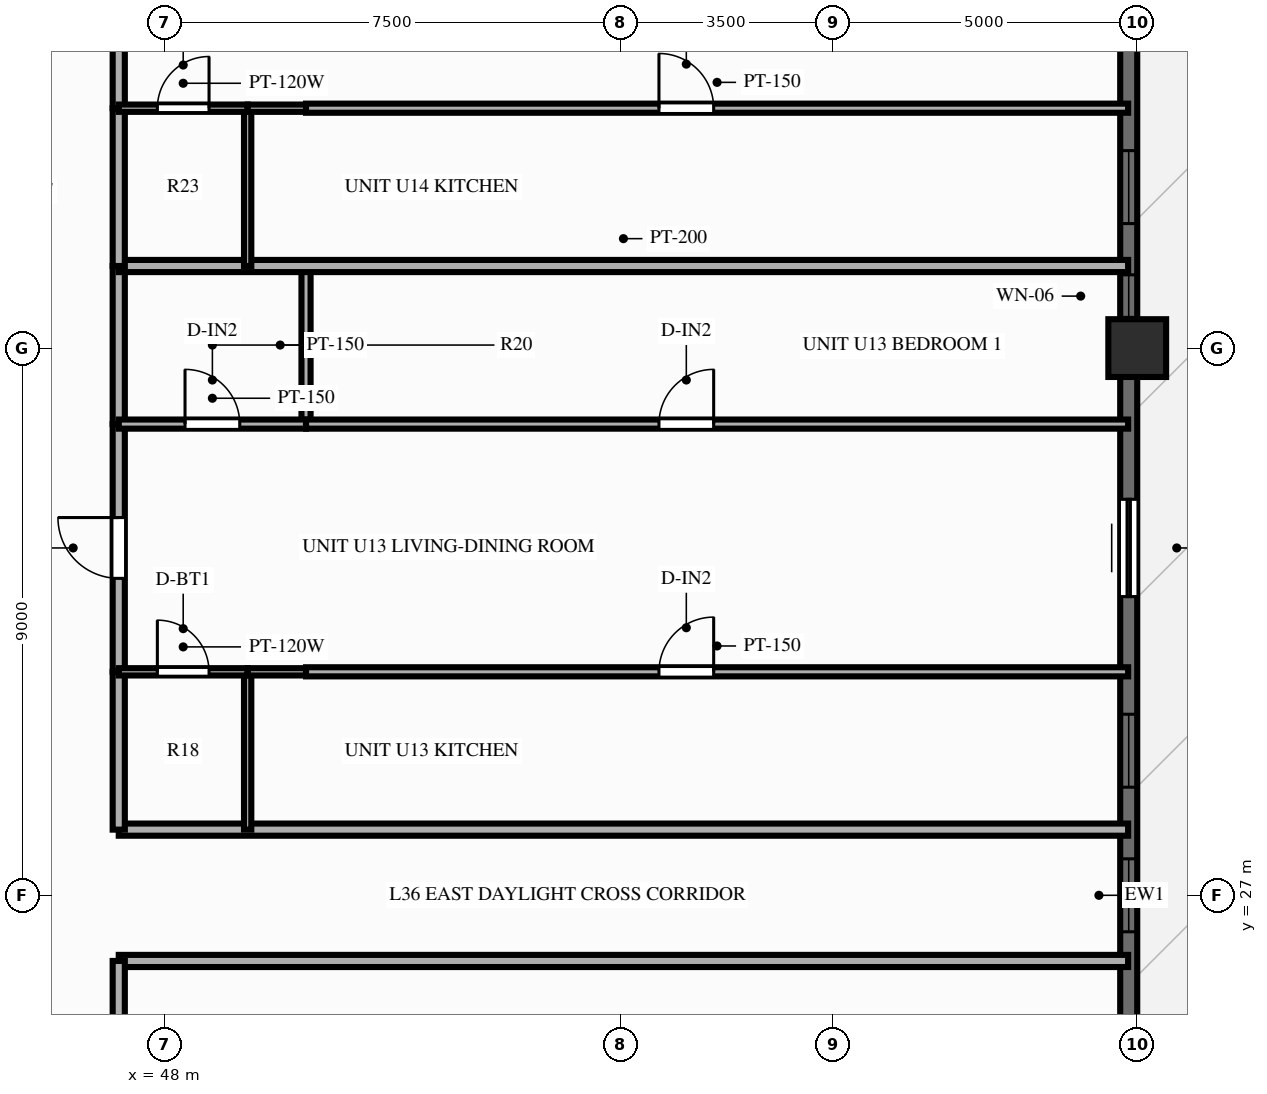
"""IFC4 building model, lengths in metres.
Left out: names, types, materials, properties, quantities, classifications, styles, units other than length and angle.
Written with IfcOpenShell. Run it as: python <this file> out.ifc"""

import sys

from ifc_helpers import new_model, si_unit, direction, frame, frame_2d, origin, origin_2d, place, context, subcontext, project, spatial, rectangle, extrude, source, transform, mapped, element, fill, save


model = new_model("IFC4")
c1 = context("Model", 3, precision=1e-05, world=origin(), true_north=direction((0.0, 1.0)))
c2 = subcontext(c1, "Body", "Model", "MODEL_VIEW")
j1 = project(units=[si_unit("LENGTHUNIT", "METRE"), si_unit("PLANEANGLEUNIT", "RADIAN")], contexts=[c1])
p1 = place(None, origin())
s1 = spatial("IfcSite", under=j1, at=p1, CompositionType="ELEMENT")
p2 = place(p1, origin())
s2 = spatial("IfcBuilding", under=s1, at=p2, CompositionType="ELEMENT")
p3 = place(p2, frame((0.0, 0.0, 113.85)))
s3 = spatial("IfcBuildingStorey", under=s2, at=p3, CompositionType="ELEMENT", Elevation=113.85)
m1 = source(origin(), c2, "Body", "SweptSolid", [
    extrude(rectangle(XDim=0.95, YDim=0.95, at=origin_2d()), origin(), (0.0, 0.0, 1.0), 3.0),
])
p4 = place(p3, frame((64.0, 36.0, 0.0), z_axis=(0.0, 0.0, 1.0), x_axis=(1.0, 0.0, 0.0)))
e1 = element("IfcColumn", 1, at=p4, inside=s3, PredefinedType="COLUMN", context=c2, shape_type="MappedRepresentation", body=[
    mapped(m1, transform((0.0, 0.0, 0.0), scale=1.0)),
])
p5 = place(p3, frame((63.86, 7.2, 0.0), z_axis=(0.0, 0.0, 1.0), x_axis=(0.0, 1.0, 0.0)))
e2 = element("IfcWall", 2, at=p5, inside=s3, PredefinedType="SOLIDWALL", context=c2, shape_type="SweptSolid", body=[
    extrude(rectangle(XDim=39.6, YDim=0.28, at=frame_2d((19.8, 0.0))), origin(), (0.0, 0.0, 1.0), 2.28),
])
p6 = place(p5, frame((1.56, 0.0, 0.25)))
e3 = element("IfcOpeningElement", 3, at=p6, cuts=e2, PredefinedType="OPENING", context=c2, shape_type="SweptSolid", body=[
    extrude(rectangle(XDim=1.2, YDim=1.5, at=frame_2d((0.6, 0.75))), frame((0.0, 0.152, 0.0), z_axis=(0.0, -1.0, 0.0), x_axis=(1.0, 0.0, 0.0)), (0.0, 0.0, 1.0), 0.304),
])
p7 = place(p5, frame((4.829, 0.0, 0.25)))
e4 = element("IfcOpeningElement", 4, at=p7, cuts=e2, PredefinedType="OPENING", context=c2, shape_type="SweptSolid", body=[
    extrude(rectangle(XDim=1.2, YDim=1.5, at=frame_2d((0.6, 0.75))), frame((0.0, 0.152, 0.0), z_axis=(0.0, -1.0, 0.0), x_axis=(1.0, 0.0, 0.0)), (0.0, 0.0, 1.0), 0.304),
])
p8 = place(p5, frame((7.567, 0.0, 0.25)))
e5 = element("IfcOpeningElement", 5, at=p8, cuts=e2, PredefinedType="OPENING", context=c2, shape_type="SweptSolid", body=[
    extrude(rectangle(XDim=1.2, YDim=1.5, at=frame_2d((0.6, 0.75))), frame((0.0, 0.152, 0.0), z_axis=(0.0, -1.0, 0.0), x_axis=(1.0, 0.0, 0.0)), (0.0, 0.0, 1.0), 0.304),
])
p9 = place(p5, frame((11.476, 0.0, 0.25)))
e6 = element("IfcOpeningElement", 6, at=p9, cuts=e2, PredefinedType="OPENING", context=c2, shape_type="SweptSolid", body=[
    extrude(rectangle(XDim=0.95, YDim=1.5, at=frame_2d((0.475, 0.75))), frame((0.0, 0.152, 0.0), z_axis=(0.0, -1.0, 0.0), x_axis=(1.0, 0.0, 0.0)), (0.0, 0.0, 1.0), 0.304),
])
p10 = place(p5, frame((13.552, 0.0, 0.25)))
e7 = element("IfcOpeningElement", 7, at=p10, cuts=e2, PredefinedType="OPENING", context=c2, shape_type="SweptSolid", body=[
    extrude(rectangle(XDim=1.2, YDim=1.5, at=frame_2d((0.6, 0.75))), frame((0.0, 0.152, 0.0), z_axis=(0.0, -1.0, 0.0), x_axis=(1.0, 0.0, 0.0)), (0.0, 0.0, 1.0), 0.304),
])
p11 = place(p5, frame((16.518, 0.0, 0.25)))
e8 = element("IfcOpeningElement", 8, at=p11, cuts=e2, PredefinedType="OPENING", context=c2, shape_type="SweptSolid", body=[
    extrude(rectangle(XDim=1.2, YDim=1.5, at=frame_2d((0.6, 0.75))), frame((0.0, 0.152, 0.0), z_axis=(0.0, -1.0, 0.0), x_axis=(1.0, 0.0, 0.0)), (0.0, 0.0, 1.0), 0.304),
])
p12 = place(p5, frame((19.2, 0.0, 0.25)))
e9 = element("IfcOpeningElement", 9, at=p12, cuts=e2, PredefinedType="OPENING", context=c2, shape_type="SweptSolid", body=[
    extrude(rectangle(XDim=1.2, YDim=1.5, at=frame_2d((0.6, 0.75))), frame((0.0, 0.152, 0.0), z_axis=(0.0, -1.0, 0.0), x_axis=(1.0, 0.0, 0.0)), (0.0, 0.0, 1.0), 0.304),
])
p13 = place(p5, frame((21.578, 0.0, 0.25)))
e10 = element("IfcOpeningElement", 10, at=p13, cuts=e2, PredefinedType="OPENING", context=c2, shape_type="SweptSolid", body=[
    extrude(rectangle(XDim=1.2, YDim=1.5, at=frame_2d((0.6, 0.75))), frame((0.0, 0.152, 0.0), z_axis=(0.0, -1.0, 0.0), x_axis=(1.0, 0.0, 0.0)), (0.0, 0.0, 1.0), 0.304),
])
p14 = place(p5, frame((26.313, 0.0, 0.0), z_axis=(0.0, 0.0, 1.0), x_axis=(-1.0, 0.0, 0.0)))
e11 = element("IfcOpeningElement", 11, at=p14, cuts=e2, PredefinedType="OPENING", context=c2, shape_type="SweptSolid", body=[
    extrude(rectangle(XDim=1.6, YDim=2.15, at=frame_2d((0.8, 1.075))), frame((0.0, 0.152, 0.0), z_axis=(0.0, -1.0, 0.0), x_axis=(1.0, 0.0, 0.0)), (0.0, 0.0, 1.0), 0.304),
])
p15 = place(p5, frame((29.305, 0.0, 0.25)))
e12 = element("IfcOpeningElement", 12, at=p15, cuts=e2, PredefinedType="OPENING", context=c2, shape_type="SweptSolid", body=[
    extrude(rectangle(XDim=0.7, YDim=1.5, at=frame_2d((0.35, 0.75))), frame((0.0, 0.152, 0.0), z_axis=(0.0, -1.0, 0.0), x_axis=(1.0, 0.0, 0.0)), (0.0, 0.0, 1.0), 0.304),
])
p16 = place(p5, frame((30.848, 0.0, 0.25)))
e13 = element("IfcOpeningElement", 13, at=p16, cuts=e2, PredefinedType="OPENING", context=c2, shape_type="SweptSolid", body=[
    extrude(rectangle(XDim=1.2, YDim=1.5, at=frame_2d((0.6, 0.75))), frame((0.0, 0.152, 0.0), z_axis=(0.0, -1.0, 0.0), x_axis=(1.0, 0.0, 0.0)), (0.0, 0.0, 1.0), 0.304),
])
p17 = place(p5, frame((34.183, 0.0, 0.25)))
e14 = element("IfcOpeningElement", 14, at=p17, cuts=e2, PredefinedType="OPENING", context=c2, shape_type="SweptSolid", body=[
    extrude(rectangle(XDim=1.2, YDim=1.5, at=frame_2d((0.6, 0.75))), frame((0.0, 0.152, 0.0), z_axis=(0.0, -1.0, 0.0), x_axis=(1.0, 0.0, 0.0)), (0.0, 0.0, 1.0), 0.304),
])
p18 = place(p5, frame((37.452, 0.0, 0.25)))
e15 = element("IfcOpeningElement", 15, at=p18, cuts=e2, PredefinedType="OPENING", context=c2, shape_type="SweptSolid", body=[
    extrude(rectangle(XDim=1.2, YDim=1.5, at=frame_2d((0.6, 0.75))), frame((0.0, 0.152, 0.0), z_axis=(0.0, -1.0, 0.0), x_axis=(1.0, 0.0, 0.0)), (0.0, 0.0, 1.0), 0.304),
])
p19 = place(p3, frame((47.25, 25.92, 0.0), z_axis=(0.0, 0.0, 1.0), x_axis=(1.0, 0.0, 0.0)))
e16 = element("IfcWall", 16, at=p19, inside=s3, PredefinedType="PARTITIONING", context=c2, shape_type="SweptSolid", body=[
    extrude(rectangle(XDim=16.6, YDim=0.2, at=frame_2d((8.3, 0.0))), origin(), (0.0, 0.0, 1.0), 2.79),
])
p20 = place(p3, frame((47.25, 22.716, 0.0), z_axis=(0.0, 0.0, 1.0), x_axis=(0.0, 1.0, 0.0)))
e17 = element("IfcWall", 17, at=p20, inside=s3, PredefinedType="PARTITIONING", context=c2, shape_type="SweptSolid", body=[
    extrude(rectangle(XDim=3.204, YDim=0.2, at=frame_2d((1.602, 0.0))), origin(), (0.0, 0.0, 1.0), 2.79),
])
p21 = place(p20, frame((1.102, 0.0, 0.0)))
e18 = element("IfcOpeningElement", 18, at=p21, cuts=e17, PredefinedType="OPENING", context=c2, shape_type="SweptSolid", body=[
    extrude(rectangle(XDim=1.0, YDim=2.15, at=frame_2d((0.5, 1.075))), frame((0.0, 0.112, 0.0), z_axis=(0.0, -1.0, 0.0), x_axis=(1.0, 0.0, 0.0)), (0.0, 0.0, 1.0), 0.224),
])
p22 = place(p3, frame((47.25, 28.08, 0.0), z_axis=(0.0, 0.0, 1.0), x_axis=(1.0, 0.0, 0.0)))
e19 = element("IfcWall", 19, at=p22, inside=s3, PredefinedType="PARTITIONING", context=c2, shape_type="SweptSolid", body=[
    extrude(rectangle(XDim=16.6, YDim=0.2, at=frame_2d((8.3, 0.0))), origin(), (0.0, 0.0, 1.0), 2.79),
])
p23 = place(p3, frame((47.25, 28.08, 0.0), z_axis=(0.0, 0.0, 1.0), x_axis=(0.0, 1.0, 0.0)))
e20 = element("IfcWall", 20, at=p23, inside=s3, PredefinedType="PARTITIONING", context=c2, shape_type="SweptSolid", body=[
    extrude(rectangle(XDim=2.595, YDim=0.2, at=frame_2d((1.298, 0.0))), origin(), (0.0, 0.0, 1.0), 2.79),
])
p24 = place(p3, frame((47.25, 30.676, 0.0), z_axis=(0.0, 0.0, 1.0), x_axis=(0.0, 1.0, 0.0)))
e21 = element("IfcWall", 21, at=p24, inside=s3, PredefinedType="PARTITIONING", context=c2, shape_type="SweptSolid", body=[
    extrude(rectangle(XDim=4.074, YDim=0.2, at=frame_2d((2.037, 0.0))), origin(), (0.0, 0.0, 1.0), 2.79),
])
p25 = place(p24, frame((1.537, 0.0, 0.0)))
e22 = element("IfcOpeningElement", 22, at=p25, cuts=e21, PredefinedType="OPENING", context=c2, shape_type="SweptSolid", body=[
    extrude(rectangle(XDim=1.0, YDim=2.15, at=frame_2d((0.5, 1.075))), frame((0.0, 0.112, 0.0), z_axis=(0.0, -1.0, 0.0), x_axis=(1.0, 0.0, 0.0)), (0.0, 0.0, 1.0), 0.224),
])
p26 = place(p3, frame((47.25, 34.75, 0.0), z_axis=(0.0, 0.0, 1.0), x_axis=(0.0, 1.0, 0.0)))
e23 = element("IfcWall", 23, at=p26, inside=s3, PredefinedType="PARTITIONING", context=c2, shape_type="SweptSolid", body=[
    extrude(rectangle(XDim=2.6, YDim=0.2, at=frame_2d((1.3, 0.0))), origin(), (0.0, 0.0, 1.0), 2.79),
])
p27 = place(p3, frame((49.37, 28.08, 0.0), z_axis=(0.0, 0.0, 1.0), x_axis=(0.0, 1.0, 0.0)))
e24 = element("IfcWall", 24, at=p27, inside=s3, PredefinedType="PARTITIONING", context=c2, shape_type="SweptSolid", body=[
    extrude(rectangle(XDim=2.595, YDim=0.12, at=frame_2d((1.298, 0.0))), origin(), (0.0, 0.0, 1.0), 2.79),
])
p28 = place(p3, frame((50.33, 34.75, 0.0), z_axis=(0.0, 0.0, 1.0), x_axis=(0.0, 1.0, 0.0)))
e25 = element("IfcWall", 25, at=p28, inside=s3, PredefinedType="PARTITIONING", context=c2, shape_type="SweptSolid", body=[
    extrude(rectangle(XDim=2.6, YDim=0.15, at=frame_2d((1.3, 0.0))), origin(), (0.0, 0.0, 1.0), 2.79),
])
p29 = place(p3, frame((47.25, 30.676, 0.0), z_axis=(0.0, 0.0, 1.0), x_axis=(1.0, 0.0, 0.0)))
e26 = element("IfcWall", 26, at=p29, inside=s3, PredefinedType="PARTITIONING", context=c2, shape_type="SweptSolid", body=[
    extrude(rectangle(XDim=2.12, YDim=0.12, at=frame_2d((1.06, 0.0))), origin(), (0.0, 0.0, 1.0), 2.79),
])
p30 = place(p29, frame((0.635, 0.0, 0.0)))
e27 = element("IfcOpeningElement", 27, at=p30, cuts=e26, PredefinedType="OPENING", context=c2, shape_type="SweptSolid", body=[
    extrude(rectangle(XDim=0.85, YDim=2.05, at=frame_2d((0.425, 1.025))), frame((0.0, 0.072, 0.0), z_axis=(0.0, -1.0, 0.0), x_axis=(1.0, 0.0, 0.0)), (0.0, 0.0, 1.0), 0.144),
])
p31 = place(p3, frame((49.37, 30.676, 0.0), z_axis=(0.0, 0.0, 1.0), x_axis=(1.0, 0.0, 0.0)))
e28 = element("IfcWall", 28, at=p31, inside=s3, PredefinedType="PARTITIONING", context=c2, shape_type="SweptSolid", body=[
    extrude(rectangle(XDim=0.96, YDim=0.12, at=frame_2d((0.48, 0.0))), origin(), (0.0, 0.0, 1.0), 2.79),
])
p32 = place(p3, frame((50.33, 30.676, 0.0), z_axis=(0.0, 0.0, 1.0), x_axis=(1.0, 0.0, 0.0)))
e29 = element("IfcWall", 29, at=p32, inside=s3, PredefinedType="PARTITIONING", context=c2, shape_type="SweptSolid", body=[
    extrude(rectangle(XDim=13.52, YDim=0.15, at=frame_2d((6.76, 0.0))), origin(), (0.0, 0.0, 1.0), 2.79),
])
p33 = place(p32, frame((5.804, 0.0, 0.0)))
e30 = element("IfcOpeningElement", 30, at=p33, cuts=e29, PredefinedType="OPENING", context=c2, shape_type="SweptSolid", body=[
    extrude(rectangle(XDim=0.9, YDim=2.1, at=frame_2d((0.45, 1.05))), frame((0.0, 0.087, 0.0), z_axis=(0.0, -1.0, 0.0), x_axis=(1.0, 0.0, 0.0)), (0.0, 0.0, 1.0), 0.174),
])
p34 = place(p3, frame((47.25, 34.75, 0.0), z_axis=(0.0, 0.0, 1.0), x_axis=(1.0, 0.0, 0.0)))
e31 = element("IfcWall", 31, at=p34, inside=s3, PredefinedType="PARTITIONING", context=c2, shape_type="SweptSolid", body=[
    extrude(rectangle(XDim=3.08, YDim=0.15, at=frame_2d((1.54, 0.0))), origin(), (0.0, 0.0, 1.0), 2.79),
])
p35 = place(p34, frame((1.09, 0.0, 0.0)))
e32 = element("IfcOpeningElement", 32, at=p35, cuts=e31, PredefinedType="OPENING", context=c2, shape_type="SweptSolid", body=[
    extrude(rectangle(XDim=0.9, YDim=2.1, at=frame_2d((0.45, 1.05))), frame((0.0, 0.087, 0.0), z_axis=(0.0, -1.0, 0.0), x_axis=(1.0, 0.0, 0.0)), (0.0, 0.0, 1.0), 0.174),
])
p36 = place(p3, frame((50.33, 34.75, 0.0), z_axis=(0.0, 0.0, 1.0), x_axis=(1.0, 0.0, 0.0)))
e33 = element("IfcWall", 33, at=p36, inside=s3, PredefinedType="PARTITIONING", context=c2, shape_type="SweptSolid", body=[
    extrude(rectangle(XDim=13.52, YDim=0.15, at=frame_2d((6.76, 0.0))), origin(), (0.0, 0.0, 1.0), 2.79),
])
p37 = place(p36, frame((5.804, 0.0, 0.0)))
e34 = element("IfcOpeningElement", 34, at=p37, cuts=e33, PredefinedType="OPENING", context=c2, shape_type="SweptSolid", body=[
    extrude(rectangle(XDim=0.9, YDim=2.1, at=frame_2d((0.45, 1.05))), frame((0.0, 0.087, 0.0), z_axis=(0.0, -1.0, 0.0), x_axis=(1.0, 0.0, 0.0)), (0.0, 0.0, 1.0), 0.174),
])
p38 = place(p3, frame((47.25, 37.35, 0.0), z_axis=(0.0, 0.0, 1.0), x_axis=(1.0, 0.0, 0.0)))
e35 = element("IfcWall", 35, at=p38, inside=s3, PredefinedType="PARTITIONING", context=c2, shape_type="SweptSolid", body=[
    extrude(rectangle(XDim=16.6, YDim=0.2, at=frame_2d((8.3, 0.0))), origin(), (0.0, 0.0, 1.0), 2.79),
])
p39 = place(p3, frame((47.25, 37.35, 0.0), z_axis=(0.0, 0.0, 1.0), x_axis=(0.0, 1.0, 0.0)))
e36 = element("IfcWall", 36, at=p39, inside=s3, PredefinedType="PARTITIONING", context=c2, shape_type="SweptSolid", body=[
    extrude(rectangle(XDim=2.595, YDim=0.2, at=frame_2d((1.298, 0.0))), origin(), (0.0, 0.0, 1.0), 2.79),
])
p40 = place(p3, frame((47.25, 39.946, 0.0), z_axis=(0.0, 0.0, 1.0), x_axis=(0.0, 1.0, 0.0)))
e37 = element("IfcWall", 37, at=p40, inside=s3, PredefinedType="PARTITIONING", context=c2, shape_type="SweptSolid", body=[
    extrude(rectangle(XDim=4.074, YDim=0.2, at=frame_2d((2.037, 0.0))), origin(), (0.0, 0.0, 1.0), 2.79),
])
p41 = place(p40, frame((1.537, 0.0, 0.0)))
e38 = element("IfcOpeningElement", 38, at=p41, cuts=e37, PredefinedType="OPENING", context=c2, shape_type="SweptSolid", body=[
    extrude(rectangle(XDim=1.0, YDim=2.15, at=frame_2d((0.5, 1.075))), frame((0.0, 0.112, 0.0), z_axis=(0.0, -1.0, 0.0), x_axis=(1.0, 0.0, 0.0)), (0.0, 0.0, 1.0), 0.224),
])
p42 = place(p3, frame((49.37, 37.35, 0.0), z_axis=(0.0, 0.0, 1.0), x_axis=(0.0, 1.0, 0.0)))
e39 = element("IfcWall", 39, at=p42, inside=s3, PredefinedType="PARTITIONING", context=c2, shape_type="SweptSolid", body=[
    extrude(rectangle(XDim=2.595, YDim=0.12, at=frame_2d((1.298, 0.0))), origin(), (0.0, 0.0, 1.0), 2.79),
])
p43 = place(p3, frame((47.25, 39.946, 0.0), z_axis=(0.0, 0.0, 1.0), x_axis=(1.0, 0.0, 0.0)))
e40 = element("IfcWall", 40, at=p43, inside=s3, PredefinedType="PARTITIONING", context=c2, shape_type="SweptSolid", body=[
    extrude(rectangle(XDim=2.12, YDim=0.12, at=frame_2d((1.06, 0.0))), origin(), (0.0, 0.0, 1.0), 2.79),
])
p44 = place(p43, frame((0.635, 0.0, 0.0)))
e41 = element("IfcOpeningElement", 41, at=p44, cuts=e40, PredefinedType="OPENING", context=c2, shape_type="SweptSolid", body=[
    extrude(rectangle(XDim=0.85, YDim=2.05, at=frame_2d((0.425, 1.025))), frame((0.0, 0.072, 0.0), z_axis=(0.0, -1.0, 0.0), x_axis=(1.0, 0.0, 0.0)), (0.0, 0.0, 1.0), 0.144),
])
p45 = place(p3, frame((49.37, 39.946, 0.0), z_axis=(0.0, 0.0, 1.0), x_axis=(1.0, 0.0, 0.0)))
e42 = element("IfcWall", 42, at=p45, inside=s3, PredefinedType="PARTITIONING", context=c2, shape_type="SweptSolid", body=[
    extrude(rectangle(XDim=0.96, YDim=0.12, at=frame_2d((0.48, 0.0))), origin(), (0.0, 0.0, 1.0), 2.79),
])
p46 = place(p3, frame((50.33, 39.946, 0.0), z_axis=(0.0, 0.0, 1.0), x_axis=(1.0, 0.0, 0.0)))
e43 = element("IfcWall", 43, at=p46, inside=s3, PredefinedType="PARTITIONING", context=c2, shape_type="SweptSolid", body=[
    extrude(rectangle(XDim=13.52, YDim=0.15, at=frame_2d((6.76, 0.0))), origin(), (0.0, 0.0, 1.0), 2.79),
])
p47 = place(p46, frame((5.804, 0.0, 0.0)))
e44 = element("IfcOpeningElement", 44, at=p47, cuts=e43, PredefinedType="OPENING", context=c2, shape_type="SweptSolid", body=[
    extrude(rectangle(XDim=0.9, YDim=2.1, at=frame_2d((0.45, 1.05))), frame((0.0, 0.087, 0.0), z_axis=(0.0, -1.0, 0.0), x_axis=(1.0, 0.0, 0.0)), (0.0, 0.0, 1.0), 0.174),
])
m2 = source(origin(), c2, "Body", "SweptSolid", [
    extrude(rectangle(XDim=1.2, YDim=1.5, at=frame_2d((0.6, 0.75))), frame((0.0, 0.03, 0.0), z_axis=(0.0, -1.0, 0.0), x_axis=(1.0, 0.0, 0.0)), (0.0, 0.0, 1.0), 0.06),
])
p48 = place(p12, origin())
e45 = element("IfcWindow", 45, at=p48, inside=s3, PartitioningType="SINGLE_PANEL", PredefinedType="WINDOW", context=c2, shape_type="MappedRepresentation", body=[
    mapped(m2, transform((0.0, 0.0, 0.0), scale=1.0)),
])
fill(e9, e45)
p49 = place(p13, origin())
e46 = element("IfcWindow", 46, at=p49, inside=s3, PartitioningType="SINGLE_PANEL", PredefinedType="WINDOW", context=c2, shape_type="MappedRepresentation", body=[
    mapped(m2, transform((0.0, 0.0, 0.0), scale=1.0)),
])
fill(e10, e46)
m3 = source(origin(), c2, "Body", "SweptSolid", [
    extrude(rectangle(XDim=1.6, YDim=2.15, at=frame_2d((0.8, 1.075))), frame((0.0, 0.025, 0.0), z_axis=(0.0, -1.0, 0.0), x_axis=(1.0, 0.0, 0.0)), (0.0, 0.0, 1.0), 0.05),
])
p50 = place(p14, origin())
e47 = element("IfcDoor", 47, at=p50, inside=s3, OperationType="SLIDING_TO_LEFT", PredefinedType="DOOR", context=c2, shape_type="MappedRepresentation", body=[
    mapped(m3, transform((0.0, 0.0, 0.0), scale=1.0)),
])
fill(e11, e47)
m4 = source(origin(), c2, "Body", "SweptSolid", [
    extrude(rectangle(XDim=0.7, YDim=1.5, at=frame_2d((0.35, 0.75))), frame((0.0, 0.03, 0.0), z_axis=(0.0, -1.0, 0.0), x_axis=(1.0, 0.0, 0.0)), (0.0, 0.0, 1.0), 0.06),
])
p51 = place(p15, origin())
e48 = element("IfcWindow", 48, at=p51, inside=s3, PartitioningType="SINGLE_PANEL", PredefinedType="WINDOW", context=c2, shape_type="MappedRepresentation", body=[
    mapped(m4, transform((0.0, 0.0, 0.0), scale=1.0)),
])
fill(e12, e48)
p52 = place(p16, origin())
e49 = element("IfcWindow", 49, at=p52, inside=s3, PartitioningType="SINGLE_PANEL", PredefinedType="WINDOW", context=c2, shape_type="MappedRepresentation", body=[
    mapped(m2, transform((0.0, 0.0, 0.0), scale=1.0)),
])
fill(e13, e49)
m5 = source(origin(), c2, "Body", "SweptSolid", [
    extrude(rectangle(XDim=1.0, YDim=2.15, at=frame_2d((0.5, 1.075))), frame((0.0, 0.025, 0.0), z_axis=(0.0, -1.0, 0.0), x_axis=(1.0, 0.0, 0.0)), (0.0, 0.0, 1.0), 0.05),
])
p53 = place(p25, origin())
e50 = element("IfcDoor", 50, at=p53, inside=s3, OperationType="SINGLE_SWING_RIGHT", PredefinedType="DOOR", context=c2, shape_type="MappedRepresentation", body=[
    mapped(m5, transform((0.0, 0.0, 0.0), scale=1.0)),
])
fill(e22, e50)
m6 = source(origin(), c2, "Body", "SweptSolid", [
    extrude(rectangle(XDim=0.85, YDim=2.05, at=frame_2d((0.425, 1.025))), frame((0.0, 0.025, 0.0), z_axis=(0.0, -1.0, 0.0), x_axis=(1.0, 0.0, 0.0)), (0.0, 0.0, 1.0), 0.05),
])
p54 = place(p30, origin())
e51 = element("IfcDoor", 51, at=p54, inside=s3, OperationType="SINGLE_SWING_LEFT", PredefinedType="DOOR", context=c2, shape_type="MappedRepresentation", body=[
    mapped(m6, transform((0.0, 0.0, 0.0), scale=1.0)),
])
fill(e27, e51)
m7 = source(origin(), c2, "Body", "SweptSolid", [
    extrude(rectangle(XDim=0.9, YDim=2.1, at=frame_2d((0.45, 1.05))), frame((0.0, 0.025, 0.0), z_axis=(0.0, -1.0, 0.0), x_axis=(1.0, 0.0, 0.0)), (0.0, 0.0, 1.0), 0.05),
])
p55 = place(p33, origin())
e52 = element("IfcDoor", 52, at=p55, inside=s3, OperationType="SINGLE_SWING_RIGHT", PredefinedType="DOOR", context=c2, shape_type="MappedRepresentation", body=[
    mapped(m7, transform((0.0, 0.0, 0.0), scale=1.0)),
])
fill(e30, e52)
p56 = place(p35, origin())
e53 = element("IfcDoor", 53, at=p56, inside=s3, OperationType="SINGLE_SWING_LEFT", PredefinedType="DOOR", context=c2, shape_type="MappedRepresentation", body=[
    mapped(m7, transform((0.0, 0.0, 0.0), scale=1.0)),
])
fill(e32, e53)
p57 = place(p37, origin())
e54 = element("IfcDoor", 54, at=p57, inside=s3, OperationType="SINGLE_SWING_RIGHT", PredefinedType="DOOR", context=c2, shape_type="MappedRepresentation", body=[
    mapped(m7, transform((0.0, 0.0, 0.0), scale=1.0)),
])
fill(e34, e54)
p58 = place(p44, origin())
e55 = element("IfcDoor", 55, at=p58, inside=s3, OperationType="SINGLE_SWING_RIGHT", PredefinedType="DOOR", context=c2, shape_type="MappedRepresentation", body=[
    mapped(m6, transform((0.0, 0.0, 0.0), scale=1.0)),
])
fill(e41, e55)
p59 = place(p47, origin())
e56 = element("IfcDoor", 56, at=p59, inside=s3, OperationType="SINGLE_SWING_LEFT", PredefinedType="DOOR", context=c2, shape_type="MappedRepresentation", body=[
    mapped(m7, transform((0.0, 0.0, 0.0), scale=1.0)),
])
fill(e44, e56)
save(model, sys.argv[1])
